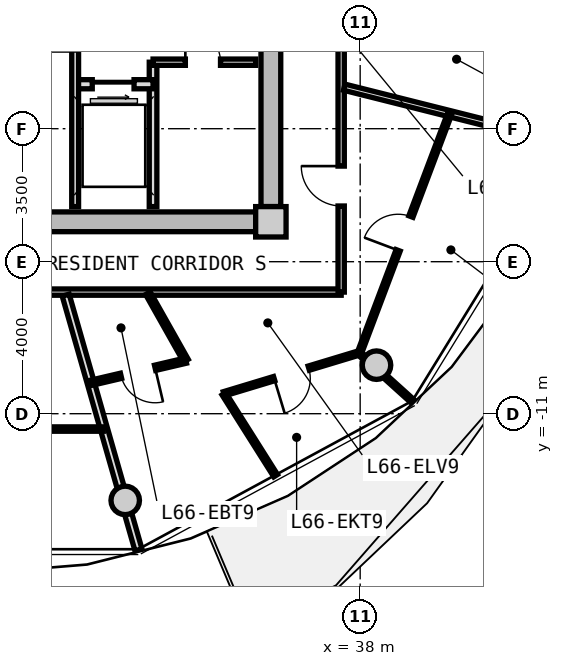
"""IFC4 building model, lengths in metres.
Left out: names, types, materials, properties, quantities, classifications, styles, units other than length and angle.
Written with IfcOpenShell. Run it as: python <this file> out.ifc"""

import sys

from ifc_helpers import new_model, si_unit, direction, frame, frame_2d, origin, origin_2d, place, context, subcontext, project, spatial, rectangle, circle, extrude, source, transform, mapped, element, fill, save


model = new_model("IFC4")
c1 = context("Model", 3, precision=1e-05, world=origin(), true_north=direction((0.0, 1.0)))
c2 = subcontext(c1, "Body", "Model", "MODEL_VIEW")
j1 = project(units=[si_unit("LENGTHUNIT", "METRE"), si_unit("PLANEANGLEUNIT", "RADIAN")], contexts=[c1])
p1 = place(None, origin())
s1 = spatial("IfcSite", under=j1, at=p1, CompositionType="ELEMENT")
p2 = place(p1, origin())
s2 = spatial("IfcBuilding", under=s1, at=p2, CompositionType="ELEMENT")
p3 = place(p2, frame((0.0, 0.0, 213.9)))
s3 = spatial("IfcBuildingStorey", under=s2, at=p3, CompositionType="ELEMENT", Elevation=213.9)
m1 = source(origin(), c2, "Body", "SweptSolid", [
    extrude(rectangle(XDim=0.8, YDim=0.8, at=origin_2d()), origin(), (0.0, 0.0, 1.0), 3.05),
])
p4 = place(p3, frame((35.65, -5.95, 0.0), z_axis=(0.0, 0.0, 1.0), x_axis=(1.0, 0.0, 0.0)))
e1 = element("IfcColumn", 1, at=p4, inside=s3, PredefinedType="COLUMN", context=c2, shape_type="MappedRepresentation", body=[
    mapped(m1, transform((0.0, 0.0, 0.0), x_axis=(1.0, 0.0, 0.0), y_axis=(0.0, 1.0, 0.0), z_axis=(0.0, 0.0, 1.0), scale=1.0)),
])
m2 = source(origin(), c2, "Body", "SweptSolid", [
    extrude(rectangle(XDim=14.5, YDim=0.52, at=frame_2d((7.25, 0.0))), origin(), (0.0, 0.0, 1.0), 2.76),
])
p5 = place(p3, frame((35.25, -5.95, 0.0), z_axis=(0.0, 0.0, 1.0), x_axis=(-1.0, 0.0, 0.0)))
e2 = element("IfcWall", 2, at=p5, inside=s3, PredefinedType="SHEAR", context=c2, shape_type="MappedRepresentation", body=[
    mapped(m2, transform((0.0, 0.0, 0.0), x_axis=(1.0, 0.0, 0.0), y_axis=(0.0, 1.0, 0.0), z_axis=(0.0, 0.0, 1.0), scale=1.0)),
])
m3 = source(origin(), c2, "Body", "SweptSolid", [
    extrude(rectangle(XDim=11.1, YDim=0.52, at=frame_2d((5.55, 0.0))), origin(), (0.0, 0.0, 1.0), 2.76),
])
p6 = place(p3, frame((35.65, 5.55, 0.0), z_axis=(0.0, 0.0, 1.0), x_axis=(0.0, -1.0, 0.0)))
e3 = element("IfcWall", 3, at=p6, inside=s3, PredefinedType="SHEAR", context=c2, shape_type="MappedRepresentation", body=[
    mapped(m3, transform((0.0, 0.0, 0.0), x_axis=(1.0, 0.0, 0.0), y_axis=(0.0, 1.0, 0.0), z_axis=(0.0, 0.0, 1.0), scale=1.0)),
])
p7 = place(p6, frame((5.65, 0.0, 0.0)))
e4 = element("IfcOpeningElement", 4, at=p7, cuts=e3, PredefinedType="OPENING", context=c2, shape_type="SweptSolid", body=[
    extrude(rectangle(XDim=1.2, YDim=2.15, at=frame_2d((0.6, 1.075))), frame((0.0, 0.27, 0.0), z_axis=(0.0, -1.0, 0.0), x_axis=(1.0, 0.0, 0.0)), (0.0, 0.0, 1.0), 0.54),
])
m4 = source(origin(), c2, "Body", "SweptSolid", [
    extrude(circle(Radius=0.375, at=origin_2d()), origin(), (0.0, 0.0, 1.0), 3.05),
])
for number, where, z_axis, x_axis in (
    (5, (31.818, -13.281, 0.0), (0.0, 0.0, 1.0), (1.0, 0.0, 0.0)),
    (6, (38.43, -9.723, 0.0), (0.0, 0.0, 1.0), (1.0, 0.0, 0.0)),
):
    element("IfcColumn", number, at=place(p3, frame(where, z_axis=z_axis, x_axis=x_axis)), inside=s3, PredefinedType="COLUMN", context=c2, shape_type="MappedRepresentation", body=[
        mapped(m4, transform((0.0, 0.0, 0.0), x_axis=(1.0, 0.0, 0.0), y_axis=(0.0, 1.0, 0.0), z_axis=(0.0, 0.0, 1.0), scale=1.0)),
    ])
m5 = source(origin(), c2, "Body", "SweptSolid", [
    extrude(rectangle(XDim=3.8, YDim=0.2, at=frame_2d((1.9, 0.0))), origin(), (0.0, 0.0, 1.0), 2.745),
])
p8 = place(p3, frame((32.55, -5.55, 0.0), z_axis=(0.0, 0.0, 1.0), x_axis=(0.0, 1.0, 0.0)))
e7 = element("IfcWall", 7, at=p8, inside=s3, PredefinedType="PARTITIONING", context=c2, shape_type="MappedRepresentation", body=[
    mapped(m5, transform((0.0, 0.0, 0.0), x_axis=(1.0, 0.0, 0.0), y_axis=(0.0, 1.0, 0.0), z_axis=(0.0, 0.0, 1.0), scale=1.0)),
])
m6 = source(origin(), c2, "Body", "SweptSolid", [
    extrude(rectangle(XDim=2.05, YDim=0.24, at=frame_2d((1.025, 0.0))), origin(), (0.0, 0.0, 1.0), 2.745),
])
p9 = place(p3, frame((30.5, -2.33, 0.0), z_axis=(0.0, 0.0, 1.0), x_axis=(1.0, 0.0, 0.0)))
e8 = element("IfcWall", 8, at=p9, inside=s3, PredefinedType="PARTITIONING", context=c2, shape_type="MappedRepresentation", body=[
    mapped(m6, transform((0.0, 0.0, 0.0), x_axis=(1.0, 0.0, 0.0), y_axis=(0.0, 1.0, 0.0), z_axis=(0.0, 0.0, 1.0), scale=1.0)),
])
p10 = place(p9, frame((0.45, 0.0, 0.0)))
e9 = element("IfcOpeningElement", 9, at=p10, cuts=e8, PredefinedType="OPENING", context=c2, shape_type="SweptSolid", body=[
    extrude(rectangle(XDim=1.1, YDim=2.2, at=frame_2d((0.55, 1.1))), frame((0.0, 0.13, 0.0), z_axis=(0.0, -1.0, 0.0), x_axis=(1.0, 0.0, 0.0)), (0.0, 0.0, 1.0), 0.26),
])
m7 = source(origin(), c2, "Body", "SweptSolid", [
    extrude(rectangle(XDim=4.2, YDim=0.18, at=frame_2d((2.1, 0.0))), origin(), (0.0, 0.0, 1.0), 2.745),
])
p11 = place(p3, frame((30.5, -5.55, 0.0), z_axis=(0.0, 0.0, 1.0), x_axis=(0.0, 1.0, 0.0)))
e10 = element("IfcWall", 10, at=p11, inside=s3, PredefinedType="PARTITIONING", context=c2, shape_type="MappedRepresentation", body=[
    mapped(m7, transform((0.0, 0.0, 0.0), x_axis=(1.0, 0.0, 0.0), y_axis=(0.0, 1.0, 0.0), z_axis=(0.0, 0.0, 1.0), scale=1.0)),
])
m8 = source(origin(), c2, "Body", "SweptSolid", [
    extrude(rectangle(XDim=2.7, YDim=0.165, at=frame_2d((1.35, 0.0))), origin(), (0.0, 0.0, 1.0), 2.745),
])
p12 = place(p3, frame((32.55, -1.75, 0.0), z_axis=(0.0, 0.0, 1.0), x_axis=(1.0, 0.0, 0.0)))
e11 = element("IfcWall", 11, at=p12, inside=s3, PredefinedType="PARTITIONING", context=c2, shape_type="MappedRepresentation", body=[
    mapped(m8, transform((0.0, 0.0, 0.0), x_axis=(1.0, 0.0, 0.0), y_axis=(0.0, 1.0, 0.0), z_axis=(0.0, 0.0, 1.0), scale=1.0)),
])
p13 = place(p12, frame((0.85, 0.0, 0.0)))
e12 = element("IfcOpeningElement", 12, at=p13, cuts=e11, PredefinedType="OPENING", context=c2, shape_type="SweptSolid", body=[
    extrude(rectangle(XDim=0.925, YDim=2.1, at=frame_2d((0.462, 1.05))), frame((0.0, 0.093, 0.0), z_axis=(0.0, -1.0, 0.0), x_axis=(1.0, 0.0, 0.0)), (0.0, 0.0, 1.0), 0.185),
])
m9 = source(origin(), c2, "Body", "SweptSolid", [
    extrude(rectangle(XDim=19.0, YDim=0.165, at=frame_2d((9.5, 0.0))), origin(), (0.0, 0.0, 1.0), 2.745),
])
p14 = place(p3, frame((37.5, -7.8, 0.0), z_axis=(0.0, 0.0, 1.0), x_axis=(-1.0, 0.0, 0.0)))
e13 = element("IfcWall", 13, at=p14, inside=s3, PredefinedType="PARTITIONING", context=c2, shape_type="MappedRepresentation", body=[
    mapped(m9, transform((0.0, 0.0, 0.0), x_axis=(1.0, 0.0, 0.0), y_axis=(0.0, 1.0, 0.0), z_axis=(0.0, 0.0, 1.0), scale=1.0)),
])
p15 = place(p14, frame((12.473, 0.0, 0.0)))
e14 = element("IfcOpeningElement", 14, at=p15, cuts=e13, PredefinedType="OPENING", context=c2, shape_type="SweptSolid", body=[
    extrude(rectangle(XDim=1.05, YDim=2.15, at=frame_2d((0.525, 1.075))), frame((0.0, 0.093, 0.0), z_axis=(0.0, -1.0, 0.0), x_axis=(1.0, 0.0, 0.0)), (0.0, 0.0, 1.0), 0.185),
])
m10 = source(origin(), c2, "Body", "SweptSolid", [
    extrude(rectangle(XDim=6.88, YDim=0.165, at=frame_2d((3.44, 0.0))), origin(), (0.0, 0.0, 1.0), 2.745),
])
p16 = place(p3, frame((37.5, -0.92, 0.0), z_axis=(0.0, 0.0, 1.0), x_axis=(0.0, -1.0, 0.0)))
e15 = element("IfcWall", 15, at=p16, inside=s3, PredefinedType="PARTITIONING", context=c2, shape_type="MappedRepresentation", body=[
    mapped(m10, transform((0.0, 0.0, 0.0), x_axis=(1.0, 0.0, 0.0), y_axis=(0.0, 1.0, 0.0), z_axis=(0.0, 0.0, 1.0), scale=1.0)),
])
p17 = place(p16, frame((3.564, 0.0, 0.0)))
e16 = element("IfcOpeningElement", 16, at=p17, cuts=e15, PredefinedType="OPENING", context=c2, shape_type="SweptSolid", body=[
    extrude(rectangle(XDim=1.05, YDim=2.15, at=frame_2d((0.525, 1.075))), frame((0.0, 0.093, 0.0), z_axis=(0.0, -1.0, 0.0), x_axis=(1.0, 0.0, 0.0)), (0.0, 0.0, 1.0), 0.185),
])
m11 = source(origin(), c2, "Body", "SweptSolid", [
    extrude(rectangle(XDim=6.157, YDim=0.165, at=frame_2d((3.079, 0.0))), origin(), (0.0, 0.0, 1.0), 2.345),
])
p18 = place(p3, frame((37.58, -2.407, 0.0), z_axis=(0.0, 0.0, 1.0), x_axis=(0.969840867184, -0.243738984038, 0.0)))
e17 = element("IfcWall", 17, at=p18, inside=s3, PredefinedType="PARTITIONING", context=c2, shape_type="MappedRepresentation", body=[
    mapped(m11, transform((0.0, 0.0, 0.0), x_axis=(1.0, 0.0, 0.0), y_axis=(0.0, 1.0, 0.0), z_axis=(0.0, 0.0, 1.0), scale=1.0)),
])
m12 = source(origin(), c2, "Body", "SweptSolid", [
    extrude(rectangle(XDim=6.974, YDim=0.19, at=frame_2d((3.487, 0.0))), origin(), (0.0, 0.0, 1.0), 2.345),
])
p19 = place(p3, frame((30.251, -7.88, 0.0), z_axis=(0.0, 0.0, 1.0), x_axis=(0.274707256801, -0.961527910703, 0.0)))
e18 = element("IfcWall", 18, at=p19, inside=s3, PredefinedType="PARTITIONING", context=c2, shape_type="MappedRepresentation", body=[
    mapped(m12, transform((0.0, 0.0, 0.0), x_axis=(1.0, 0.0, 0.0), y_axis=(0.0, 1.0, 0.0), z_axis=(0.0, 0.0, 1.0), scale=1.0)),
])
m13 = source(origin(), c2, "Body", "SweptSolid", [
    extrude(rectangle(XDim=6.481, YDim=0.115, at=frame_2d((3.24, 0.0))), origin(), (0.0, 0.0, 1.0), 2.745),
])
p20 = place(p3, frame((24.76, -11.404, 0.0), z_axis=(0.0, 0.0, 1.0), x_axis=(1.0, 0.0, 0.0)))
e19 = element("IfcWall", 19, at=p20, inside=s3, PredefinedType="PARTITIONING", context=c2, shape_type="MappedRepresentation", body=[
    mapped(m13, transform((0.0, 0.0, 0.0), x_axis=(1.0, 0.0, 0.0), y_axis=(0.0, 1.0, 0.0), z_axis=(0.0, 0.0, 1.0), scale=1.0)),
])
p21 = place(p20, frame((2.765, 0.0, 0.0)))
e20 = element("IfcOpeningElement", 20, at=p21, cuts=e19, PredefinedType="OPENING", context=c2, shape_type="SweptSolid", body=[
    extrude(rectangle(XDim=0.95, YDim=2.1, at=frame_2d((0.475, 1.05))), frame((0.0, 0.067, 0.0), z_axis=(0.0, -1.0, 0.0), x_axis=(1.0, 0.0, 0.0)), (0.0, 0.0, 1.0), 0.135),
])
m14 = source(origin(), c2, "Body", "SweptSolid", [
    extrude(rectangle(XDim=6.738, YDim=0.115, at=frame_2d((3.369, 0.0))), origin(), (0.0, 0.0, 1.0), 2.745),
])
p22 = place(p3, frame((37.978, -9.409, 0.0), z_axis=(0.0, 0.0, 1.0), x_axis=(0.352945344347, 0.935643940772, 0.0)))
e21 = element("IfcWall", 21, at=p22, inside=s3, PredefinedType="PARTITIONING", context=c2, shape_type="MappedRepresentation", body=[
    mapped(m14, transform((0.0, 0.0, 0.0), x_axis=(1.0, 0.0, 0.0), y_axis=(0.0, 1.0, 0.0), z_axis=(0.0, 0.0, 1.0), scale=1.0)),
])
p23 = place(p22, frame((2.894, 0.0, 0.0)))
e22 = element("IfcOpeningElement", 22, at=p23, cuts=e21, PredefinedType="OPENING", context=c2, shape_type="SweptSolid", body=[
    extrude(rectangle(XDim=0.95, YDim=2.1, at=frame_2d((0.475, 1.05))), frame((0.0, 0.067, 0.0), z_axis=(0.0, -1.0, 0.0), x_axis=(1.0, 0.0, 0.0)), (0.0, 0.0, 1.0), 0.135),
])
m15 = source(origin(), c2, "Body", "SweptSolid", [
    extrude(rectangle(XDim=1.894, YDim=0.115, at=frame_2d((0.947, 0.0))), origin(), (0.0, 0.0, 1.0), 2.345),
])
p24 = place(p3, frame((37.978, -9.409, 0.0), z_axis=(0.0, 0.0, 1.0), x_axis=(0.742704207382, -0.669619638554, 0.0)))
e23 = element("IfcWall", 23, at=p24, inside=s3, PredefinedType="PARTITIONING", context=c2, shape_type="MappedRepresentation", body=[
    mapped(m15, transform((0.0, 0.0, 0.0), x_axis=(1.0, 0.0, 0.0), y_axis=(0.0, 1.0, 0.0), z_axis=(0.0, 0.0, 1.0), scale=1.0)),
])
m16 = source(origin(), c2, "Body", "SweptSolid", [
    extrude(rectangle(XDim=2.035, YDim=0.14, at=frame_2d((1.018, 0.0))), origin(), (0.0, 0.0, 1.0), 2.745),
])
p25 = place(p3, frame((32.415, -7.83, 0.0), z_axis=(0.0, 0.0, 1.0), x_axis=(0.491092509169, -0.871107425888, 0.0)))
e24 = element("IfcWall", 24, at=p25, inside=s3, PredefinedType="PARTITIONING", context=c2, shape_type="MappedRepresentation", body=[
    mapped(m16, transform((0.0, 0.0, 0.0), x_axis=(1.0, 0.0, 0.0), y_axis=(0.0, 1.0, 0.0), z_axis=(0.0, 0.0, 1.0), scale=1.0)),
])
m17 = source(origin(), c2, "Body", "SweptSolid", [
    extrude(rectangle(XDim=2.586, YDim=0.14, at=frame_2d((1.293, 0.0))), origin(), (0.0, 0.0, 1.0), 2.745),
])
p26 = place(p3, frame((33.415, -9.603, 0.0), z_axis=(0.0, 0.0, 1.0), x_axis=(-0.973691298219, -0.227871138526, 0.0)))
e25 = element("IfcWall", 25, at=p26, inside=s3, PredefinedType="PARTITIONING", context=c2, shape_type="MappedRepresentation", body=[
    mapped(m17, transform((0.0, 0.0, 0.0), x_axis=(1.0, 0.0, 0.0), y_axis=(0.0, 1.0, 0.0), z_axis=(0.0, 0.0, 1.0), scale=1.0)),
])
p27 = place(p26, frame((0.833, 0.0, 0.0)))
e26 = element("IfcOpeningElement", 26, at=p27, cuts=e25, PredefinedType="OPENING", context=c2, shape_type="SweptSolid", body=[
    extrude(rectangle(XDim=0.92, YDim=2.1, at=frame_2d((0.46, 1.05))), frame((0.0, 0.08, 0.0), z_axis=(0.0, -1.0, 0.0), x_axis=(1.0, 0.0, 0.0)), (0.0, 0.0, 1.0), 0.16),
])
m18 = source(origin(), c2, "Body", "SweptSolid", [
    extrude(rectangle(XDim=2.549, YDim=0.115, at=frame_2d((1.274, 0.0))), origin(), (0.0, 0.0, 1.0), 2.745),
])
p28 = place(p3, frame((34.414, -10.477, 0.0), z_axis=(0.0, 0.0, 1.0), x_axis=(0.534108310175, -0.845416059111, 0.0)))
e27 = element("IfcWall", 27, at=p28, inside=s3, PredefinedType="PARTITIONING", context=c2, shape_type="MappedRepresentation", body=[
    mapped(m18, transform((0.0, 0.0, 0.0), x_axis=(1.0, 0.0, 0.0), y_axis=(0.0, 1.0, 0.0), z_axis=(0.0, 0.0, 1.0), scale=1.0)),
])
m19 = source(origin(), c2, "Body", "SweptSolid", [
    extrude(rectangle(XDim=3.714, YDim=0.115, at=frame_2d((1.857, 0.0))), origin(), (0.0, 0.0, 1.0), 2.745),
])
p29 = place(p3, frame((34.414, -10.477, 0.0), z_axis=(0.0, 0.0, 1.0), x_axis=(0.957188983281, 0.28946372879, 0.0)))
e28 = element("IfcWall", 28, at=p29, inside=s3, PredefinedType="PARTITIONING", context=c2, shape_type="MappedRepresentation", body=[
    mapped(m19, transform((0.0, 0.0, 0.0), x_axis=(1.0, 0.0, 0.0), y_axis=(0.0, 1.0, 0.0), z_axis=(0.0, 0.0, 1.0), scale=1.0)),
])
p30 = place(p29, frame((1.382, 0.0, 0.0)))
e29 = element("IfcOpeningElement", 29, at=p30, cuts=e28, PredefinedType="OPENING", context=c2, shape_type="SweptSolid", body=[
    extrude(rectangle(XDim=0.95, YDim=2.1, at=frame_2d((0.475, 1.05))), frame((0.0, 0.067, 0.0), z_axis=(0.0, -1.0, 0.0), x_axis=(1.0, 0.0, 0.0)), (0.0, 0.0, 1.0), 0.135),
])
m20 = source(origin(), c2, "Body", "SweptSolid", [
    extrude(rectangle(XDim=1.1, YDim=2.2, at=frame_2d((0.55, 1.1))), frame((0.0, 0.025, 0.0), z_axis=(0.0, -1.0, 0.0), x_axis=(1.0, 0.0, 0.0)), (0.0, 0.0, 1.0), 0.05),
])
p31 = place(p10, frame((1.1, 0.0, 0.0), z_axis=(0.0, 0.0, 1.0), x_axis=(-1.0, 0.0, 0.0)))
e30 = element("IfcDoor", 30, at=p31, inside=s3, OperationType="SLIDING_TO_RIGHT", PredefinedType="DOOR", context=c2, shape_type="MappedRepresentation", body=[
    mapped(m20, transform((0.0, 0.0, 0.0), x_axis=(1.0, 0.0, 0.0), y_axis=(0.0, 1.0, 0.0), z_axis=(0.0, 0.0, 1.0), scale=1.0)),
])
fill(e9, e30)
m21 = source(origin(), c2, "Body", "SweptSolid", [
    extrude(rectangle(XDim=0.925, YDim=2.1, at=frame_2d((0.462, 1.05))), frame((0.0, 0.025, 0.0), z_axis=(0.0, -1.0, 0.0), x_axis=(1.0, 0.0, 0.0)), (0.0, 0.0, 1.0), 0.05),
])
p32 = place(p13, origin())
e31 = element("IfcDoor", 31, at=p32, inside=s3, OperationType="SINGLE_SWING_LEFT", PredefinedType="DOOR", context=c2, shape_type="MappedRepresentation", body=[
    mapped(m21, transform((0.0, 0.0, 0.0), x_axis=(1.0, 0.0, 0.0), y_axis=(0.0, 1.0, 0.0), z_axis=(0.0, 0.0, 1.0), scale=1.0)),
])
fill(e12, e31)
m22 = source(origin(), c2, "Body", "SweptSolid", [
    extrude(rectangle(XDim=1.05, YDim=2.15, at=frame_2d((0.525, 1.075))), frame((0.0, 0.025, 0.0), z_axis=(0.0, -1.0, 0.0), x_axis=(1.0, 0.0, 0.0)), (0.0, 0.0, 1.0), 0.05),
])
p33 = place(p17, frame((1.05, 0.0, 0.0), z_axis=(0.0, 0.0, 1.0), x_axis=(-1.0, 0.0, 0.0)))
e32 = element("IfcDoor", 32, at=p33, inside=s3, OperationType="SINGLE_SWING_RIGHT", PredefinedType="DOOR", context=c2, shape_type="MappedRepresentation", body=[
    mapped(m22, transform((0.0, 0.0, 0.0), x_axis=(1.0, 0.0, 0.0), y_axis=(0.0, 1.0, 0.0), z_axis=(0.0, 0.0, 1.0), scale=1.0)),
])
fill(e16, e32)
m23 = source(origin(), c2, "Body", "SweptSolid", [
    extrude(rectangle(XDim=0.92, YDim=2.1, at=frame_2d((0.46, 1.05))), frame((0.0, 0.025, 0.0), z_axis=(0.0, -1.0, 0.0), x_axis=(1.0, 0.0, 0.0)), (0.0, 0.0, 1.0), 0.05),
])
p34 = place(p27, origin())
e33 = element("IfcDoor", 33, at=p34, inside=s3, OperationType="SINGLE_SWING_LEFT", PredefinedType="DOOR", context=c2, shape_type="MappedRepresentation", body=[
    mapped(m23, transform((0.0, 0.0, 0.0), x_axis=(1.0, 0.0, 0.0), y_axis=(0.0, 1.0, 0.0), z_axis=(0.0, 0.0, 1.0), scale=1.0)),
])
fill(e26, e33)
m24 = source(origin(), c2, "Body", "SweptSolid", [
    extrude(rectangle(XDim=0.95, YDim=2.1, at=frame_2d((0.475, 1.05))), frame((0.0, 0.025, 0.0), z_axis=(0.0, -1.0, 0.0), x_axis=(1.0, 0.0, 0.0)), (0.0, 0.0, 1.0), 0.05),
])
p35 = place(p30, frame((0.95, 0.0, 0.0), z_axis=(0.0, 0.0, 1.0), x_axis=(-1.0, 0.0, 0.0)))
e34 = element("IfcDoor", 34, at=p35, inside=s3, OperationType="SINGLE_SWING_RIGHT", PredefinedType="DOOR", context=c2, shape_type="MappedRepresentation", body=[
    mapped(m24, transform((0.0, 0.0, 0.0), x_axis=(1.0, 0.0, 0.0), y_axis=(0.0, 1.0, 0.0), z_axis=(0.0, 0.0, 1.0), scale=1.0)),
])
fill(e29, e34)
p36 = place(p23, origin())
e35 = element("IfcDoor", 35, at=p36, inside=s3, OperationType="SINGLE_SWING_LEFT", PredefinedType="DOOR", context=c2, shape_type="MappedRepresentation", body=[
    mapped(m24, transform((0.0, 0.0, 0.0), x_axis=(1.0, 0.0, 0.0), y_axis=(0.0, 1.0, 0.0), z_axis=(0.0, 0.0, 1.0), scale=1.0)),
])
fill(e22, e35)
save(model, sys.argv[1])
